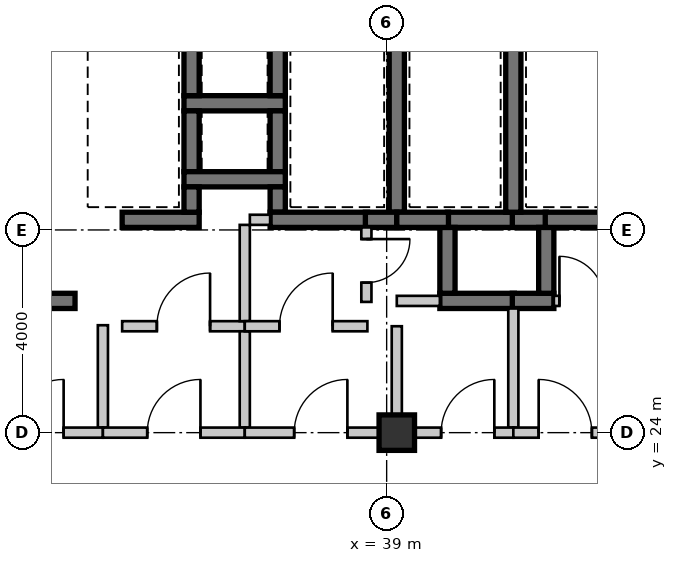
"""IFC4 building model, lengths in metres.
Left out: names, types, materials, properties, quantities, classifications, styles, units other than length and angle.
Written with IfcOpenShell. Run it as: python <this file> out.ifc"""

import sys

from ifc_helpers import new_model, si_unit, direction, frame, frame_2d, origin, origin_2d, place, context, subcontext, project, spatial, rectangle, extrude, source, transform, mapped, element, fill, save


model = new_model("IFC4")
c1 = context("Model", 3, precision=1e-05, world=origin(), true_north=direction((0.0, 1.0)))
c2 = subcontext(c1, "Body", "Model", "MODEL_VIEW")
j1 = project(units=[si_unit("LENGTHUNIT", "METRE"), si_unit("PLANEANGLEUNIT", "RADIAN")], contexts=[c1])
p1 = place(None, origin())
s1 = spatial("IfcSite", under=j1, at=p1, CompositionType="ELEMENT")
p2 = place(p1, origin())
s2 = spatial("IfcBuilding", under=s1, at=p2, CompositionType="ELEMENT")
p3 = place(p2, frame((0.0, 0.0, 80.85)))
s3 = spatial("IfcBuildingStorey", under=s2, at=p3, CompositionType="ELEMENT", Elevation=80.85)
m1 = source(origin(), c2, "Body", "SweptSolid", [
    extrude(rectangle(XDim=0.7, YDim=0.7, at=origin_2d()), origin(), (0.0, 0.0, 1.0), 3.15),
])
p4 = place(p3, frame((39.2, 24.0, 0.0), z_axis=(0.0, 0.0, 1.0), x_axis=(1.0, 0.0, 0.0)))
e1 = element("IfcColumn", 1, at=p4, inside=s3, PredefinedType="COLUMN", context=c2, shape_type="MappedRepresentation", body=[
    mapped(m1, transform((0.0, 0.0, 0.0), scale=1.0)),
])
m2 = source(origin(), c2, "Body", "SweptSolid", [
    extrude(rectangle(XDim=2.0, YDim=0.3, at=frame_2d((1.0, 0.0))), origin(), (0.0, 0.0, 1.0), 2.93),
])
p5 = place(p3, frame((35.0, 30.5, 0.0), z_axis=(0.0, 0.0, 1.0), x_axis=(1.0, 0.0, 0.0)))
e2 = element("IfcWall", 2, at=p5, inside=s3, PredefinedType="SHEAR", context=c2, shape_type="MappedRepresentation", body=[
    mapped(m2, transform((0.0, 0.0, 0.0), scale=1.0)),
])
m3 = source(origin(), c2, "Body", "SweptSolid", [
    extrude(rectangle(XDim=1.2, YDim=0.3, at=frame_2d((0.6, 0.0))), origin(), (0.0, 0.0, 1.0), 2.93),
])
for number, where, z_axis, x_axis in (
    (3, (35.15, 31.85, 0.0), (0.0, 0.0, 1.0), (0.0, -1.0, 0.0)),
    (4, (36.85, 30.65, 0.0), (0.0, 0.0, 1.0), (0.0, 1.0, 0.0)),
    (5, (35.15, 30.35, 0.0), (0.0, 0.0, 1.0), (0.0, -1.0, 0.0)),
    (6, (36.85, 29.15, 0.0), (0.0, 0.0, 1.0), (0.0, 1.0, 0.0)),
):
    element("IfcWall", number, at=place(p3, frame(where, z_axis=z_axis, x_axis=x_axis)), inside=s3, PredefinedType="SHEAR", context=c2, shape_type="MappedRepresentation", body=[
        mapped(m3, transform((0.0, 0.0, 0.0), scale=1.0)),
    ])
p6 = place(p3, frame((35.0, 29.0, 0.0), z_axis=(0.0, 0.0, 1.0), x_axis=(1.0, 0.0, 0.0)))
e7 = element("IfcWall", 7, at=p6, inside=s3, PredefinedType="SHEAR", context=c2, shape_type="MappedRepresentation", body=[
    mapped(m2, transform((0.0, 0.0, 0.0), scale=1.0)),
])
m4 = source(origin(), c2, "Body", "SweptSolid", [
    extrude(rectangle(XDim=2.2, YDim=0.3, at=frame_2d((1.1, 0.0))), origin(), (0.0, 0.0, 1.0), 2.93),
])
p7 = place(p3, frame((30.65, 26.6, 0.0), z_axis=(0.0, 0.0, 1.0), x_axis=(1.0, 0.0, 0.0)))
e8 = element("IfcWall", 8, at=p7, inside=s3, PredefinedType="SHEAR", context=c2, shape_type="MappedRepresentation", body=[
    mapped(m4, transform((0.0, 0.0, 0.0), scale=1.0)),
])
m5 = source(origin(), c2, "Body", "SweptSolid", [
    extrude(rectangle(XDim=1.32, YDim=0.3, at=frame_2d((0.66, 0.0))), origin(), (0.0, 0.0, 1.0), 2.93),
])
p8 = place(p3, frame((41.52, 28.2, 0.0), z_axis=(0.0, 0.0, 1.0), x_axis=(-1.0, 0.0, 0.0)))
e9 = element("IfcWall", 9, at=p8, inside=s3, PredefinedType="SHEAR", context=c2, shape_type="MappedRepresentation", body=[
    mapped(m5, transform((0.0, 0.0, 0.0), scale=1.0)),
])
m6 = source(origin(), c2, "Body", "SweptSolid", [
    extrude(rectangle(XDim=0.67, YDim=0.3, at=frame_2d((0.335, 0.0))), origin(), (0.0, 0.0, 1.0), 2.93),
])
p9 = place(p3, frame((42.15, 28.2, 0.0), z_axis=(0.0, 0.0, 1.0), x_axis=(-1.0, 0.0, 0.0)))
e10 = element("IfcWall", 10, at=p9, inside=s3, PredefinedType="SHEAR", context=c2, shape_type="MappedRepresentation", body=[
    mapped(m6, transform((0.0, 0.0, 0.0), scale=1.0)),
])
m7 = source(origin(), c2, "Body", "SweptSolid", [
    extrude(rectangle(XDim=1.47, YDim=0.3, at=frame_2d((0.735, 0.0))), origin(), (0.0, 0.0, 1.0), 2.93),
])
p10 = place(p3, frame((40.05, 26.6, 0.0), z_axis=(0.0, 0.0, 1.0), x_axis=(1.0, 0.0, 0.0)))
e11 = element("IfcWall", 11, at=p10, inside=s3, PredefinedType="SHEAR", context=c2, shape_type="MappedRepresentation", body=[
    mapped(m7, transform((0.0, 0.0, 0.0), scale=1.0)),
])
m8 = source(origin(), c2, "Body", "SweptSolid", [
    extrude(rectangle(XDim=1.3, YDim=0.3, at=frame_2d((0.65, 0.0))), origin(), (0.0, 0.0, 1.0), 2.93),
])
p11 = place(p3, frame((40.2, 28.05, 0.0), z_axis=(0.0, 0.0, 1.0), x_axis=(0.0, -1.0, 0.0)))
e12 = element("IfcWall", 12, at=p11, inside=s3, PredefinedType="SHEAR", context=c2, shape_type="MappedRepresentation", body=[
    mapped(m8, transform((0.0, 0.0, 0.0), scale=1.0)),
])
m9 = source(origin(), c2, "Body", "SweptSolid", [
    extrude(rectangle(XDim=0.82, YDim=0.3, at=frame_2d((0.41, 0.0))), origin(), (0.0, 0.0, 1.0), 2.93),
])
p12 = place(p3, frame((41.48, 26.6, 0.0), z_axis=(0.0, 0.0, 1.0), x_axis=(1.0, 0.0, 0.0)))
e13 = element("IfcWall", 13, at=p12, inside=s3, PredefinedType="SHEAR", context=c2, shape_type="MappedRepresentation", body=[
    mapped(m9, transform((0.0, 0.0, 0.0), scale=1.0)),
])
p13 = place(p3, frame((42.15, 26.75, 0.0), z_axis=(0.0, 0.0, 1.0), x_axis=(0.0, 1.0, 0.0)))
e14 = element("IfcWall", 14, at=p13, inside=s3, PredefinedType="SHEAR", context=c2, shape_type="MappedRepresentation", body=[
    mapped(m8, transform((0.0, 0.0, 0.0), scale=1.0)),
])
m10 = source(origin(), c2, "Body", "SweptSolid", [
    extrude(rectangle(XDim=1.52, YDim=0.3, at=frame_2d((0.76, 0.0))), origin(), (0.0, 0.0, 1.0), 2.93),
])
p14 = place(p3, frame((33.78, 28.2, 0.0), z_axis=(0.0, 0.0, 1.0), x_axis=(1.0, 0.0, 0.0)))
e15 = element("IfcWall", 15, at=p14, inside=s3, PredefinedType="SHEAR", context=c2, shape_type="MappedRepresentation", body=[
    mapped(m10, transform((0.0, 0.0, 0.0), scale=1.0)),
])
m11 = source(origin(), c2, "Body", "SweptSolid", [
    extrude(rectangle(XDim=0.5, YDim=0.3, at=frame_2d((0.25, 0.0))), origin(), (0.0, 0.0, 1.0), 2.93),
])
p15 = place(p3, frame((35.15, 28.35, 0.0), z_axis=(0.0, 0.0, 1.0), x_axis=(0.0, 1.0, 0.0)))
e16 = element("IfcWall", 16, at=p15, inside=s3, PredefinedType="SHEAR", context=c2, shape_type="MappedRepresentation", body=[
    mapped(m11, transform((0.0, 0.0, 0.0), scale=1.0)),
])
m12 = source(origin(), c2, "Body", "SweptSolid", [
    extrude(rectangle(XDim=3.5, YDim=0.3, at=frame_2d((1.75, 0.0))), origin(), (0.0, 0.0, 1.0), 2.93),
])
p16 = place(p3, frame((39.2, 28.35, 0.0), z_axis=(0.0, 0.0, 1.0), x_axis=(0.0, 1.0, 0.0)))
e17 = element("IfcWall", 17, at=p16, inside=s3, PredefinedType="SHEAR", context=c2, shape_type="MappedRepresentation", body=[
    mapped(m12, transform((0.0, 0.0, 0.0), scale=1.0)),
])
p17 = place(p3, frame((36.85, 28.85, 0.0), z_axis=(0.0, 0.0, 1.0), x_axis=(0.0, -1.0, 0.0)))
e18 = element("IfcWall", 18, at=p17, inside=s3, PredefinedType="SHEAR", context=c2, shape_type="MappedRepresentation", body=[
    mapped(m11, transform((0.0, 0.0, 0.0), scale=1.0)),
])
m13 = source(origin(), c2, "Body", "SweptSolid", [
    extrude(rectangle(XDim=1.92, YDim=0.3, at=frame_2d((0.96, 0.0))), origin(), (0.0, 0.0, 1.0), 2.93),
])
p18 = place(p3, frame((36.7, 28.2, 0.0), z_axis=(0.0, 0.0, 1.0), x_axis=(1.0, 0.0, 0.0)))
e19 = element("IfcWall", 19, at=p18, inside=s3, PredefinedType="SHEAR", context=c2, shape_type="MappedRepresentation", body=[
    mapped(m13, transform((0.0, 0.0, 0.0), scale=1.0)),
])
m14 = source(origin(), c2, "Body", "SweptSolid", [
    extrude(rectangle(XDim=0.62, YDim=0.3, at=frame_2d((0.31, 0.0))), origin(), (0.0, 0.0, 1.0), 2.93),
])
p19 = place(p3, frame((38.58, 28.2, 0.0), z_axis=(0.0, 0.0, 1.0), x_axis=(1.0, 0.0, 0.0)))
e20 = element("IfcWall", 20, at=p19, inside=s3, PredefinedType="SHEAR", context=c2, shape_type="MappedRepresentation", body=[
    mapped(m14, transform((0.0, 0.0, 0.0), scale=1.0)),
])
p20 = place(p3, frame((41.5, 28.35, 0.0), z_axis=(0.0, 0.0, 1.0), x_axis=(0.0, 1.0, 0.0)))
e21 = element("IfcWall", 21, at=p20, inside=s3, PredefinedType="SHEAR", context=c2, shape_type="MappedRepresentation", body=[
    mapped(m12, transform((0.0, 0.0, 0.0), scale=1.0)),
])
m15 = source(origin(), c2, "Body", "SweptSolid", [
    extrude(rectangle(XDim=1.02, YDim=0.3, at=frame_2d((0.51, 0.0))), origin(), (0.0, 0.0, 1.0), 2.93),
])
p21 = place(p3, frame((39.2, 28.2, 0.0), z_axis=(0.0, 0.0, 1.0), x_axis=(1.0, 0.0, 0.0)))
e22 = element("IfcWall", 22, at=p21, inside=s3, PredefinedType="SHEAR", context=c2, shape_type="MappedRepresentation", body=[
    mapped(m15, transform((0.0, 0.0, 0.0), scale=1.0)),
])
m16 = source(origin(), c2, "Body", "SweptSolid", [
    extrude(rectangle(XDim=1.44, YDim=0.3, at=frame_2d((0.72, 0.0))), origin(), (0.0, 0.0, 1.0), 2.93),
])
p22 = place(p3, frame((42.13, 28.2, 0.0), z_axis=(0.0, 0.0, 1.0), x_axis=(1.0, 0.0, 0.0)))
e23 = element("IfcWall", 23, at=p22, inside=s3, PredefinedType="SHEAR", context=c2, shape_type="MappedRepresentation", body=[
    mapped(m16, transform((0.0, 0.0, 0.0), scale=1.0)),
])
m17 = source(origin(), c2, "Body", "SweptSolid", [
    extrude(rectangle(XDim=2.02, YDim=0.2, at=frame_2d((1.01, 0.0))), origin(), (0.0, 0.0, 1.0), 2.93),
])
p23 = place(p3, frame((33.4, 26.12, 0.0), z_axis=(0.0, 0.0, 1.0), x_axis=(0.0, -1.0, 0.0)))
e24 = element("IfcWall", 24, at=p23, inside=s3, PredefinedType="SOLIDWALL", context=c2, shape_type="MappedRepresentation", body=[
    mapped(m17, transform((0.0, 0.0, 0.0), scale=1.0)),
])
m18 = source(origin(), c2, "Body", "SweptSolid", [
    extrude(rectangle(XDim=2.6, YDim=0.2, at=frame_2d((1.3, 0.0))), origin(), (0.0, 0.0, 1.0), 2.47),
])
p24 = place(p3, frame((33.4, 24.0, 0.0), z_axis=(0.0, 0.0, 1.0), x_axis=(-1.0, 0.0, 0.0)))
e25 = element("IfcWall", 25, at=p24, inside=s3, PredefinedType="SOLIDWALL", context=c2, shape_type="MappedRepresentation", body=[
    mapped(m18, transform((0.0, 0.0, 0.0), scale=1.0)),
])
m19 = source(origin(), c2, "Body", "SweptSolid", [
    extrude(rectangle(XDim=1.05, YDim=2.1, at=frame_2d((0.525, 1.05))), frame((0.0, 0.11, 0.0), z_axis=(0.0, -1.0, 0.0), x_axis=(1.0, 0.0, 0.0)), (0.0, 0.0, 1.0), 0.22),
])
p25 = place(p24, frame((0.775, 0.0, 0.0)))
e26 = element("IfcOpeningElement", 26, at=p25, cuts=e25, PredefinedType="OPENING", context=c2, shape_type="MappedRepresentation", body=[
    mapped(m19, transform((0.0, 0.0, 0.0), scale=1.0)),
])
m20 = source(origin(), c2, "Body", "SweptSolid", [
    extrude(rectangle(XDim=2.42, YDim=0.2, at=frame_2d((1.21, 0.0))), origin(), (0.0, 0.0, 1.0), 2.93),
])
p26 = place(p3, frame((33.78, 26.1, 0.0), z_axis=(0.0, 0.0, 1.0), x_axis=(1.0, 0.0, 0.0)))
e27 = element("IfcWall", 27, at=p26, inside=s3, PredefinedType="SOLIDWALL", context=c2, shape_type="MappedRepresentation", body=[
    mapped(m20, transform((0.0, 0.0, 0.0), scale=1.0)),
])
p27 = place(p26, frame((0.685, 0.0, 0.0)))
e28 = element("IfcOpeningElement", 28, at=p27, cuts=e27, PredefinedType="OPENING", context=c2, shape_type="MappedRepresentation", body=[
    mapped(m19, transform((0.0, 0.0, 0.0), scale=1.0)),
])
m21 = source(origin(), c2, "Body", "SweptSolid", [
    extrude(rectangle(XDim=1.9, YDim=0.2, at=frame_2d((0.95, 0.0))), origin(), (0.0, 0.0, 1.0), 2.93),
])
p28 = place(p3, frame((36.2, 26.0, 0.0), z_axis=(0.0, 0.0, 1.0), x_axis=(0.0, -1.0, 0.0)))
e29 = element("IfcWall", 29, at=p28, inside=s3, PredefinedType="SOLIDWALL", context=c2, shape_type="MappedRepresentation", body=[
    mapped(m21, transform((0.0, 0.0, 0.0), scale=1.0)),
])
m22 = source(origin(), c2, "Body", "SweptSolid", [
    extrude(rectangle(XDim=2.8, YDim=0.2, at=frame_2d((1.4, 0.0))), origin(), (0.0, 0.0, 1.0), 2.47),
])
p29 = place(p3, frame((36.2, 24.0, 0.0), z_axis=(0.0, 0.0, 1.0), x_axis=(-1.0, 0.0, 0.0)))
e30 = element("IfcWall", 30, at=p29, inside=s3, PredefinedType="SOLIDWALL", context=c2, shape_type="MappedRepresentation", body=[
    mapped(m22, transform((0.0, 0.0, 0.0), scale=1.0)),
])
p30 = place(p29, frame((0.875, 0.0, 0.0)))
e31 = element("IfcOpeningElement", 31, at=p30, cuts=e30, PredefinedType="OPENING", context=c2, shape_type="MappedRepresentation", body=[
    mapped(m19, transform((0.0, 0.0, 0.0), scale=1.0)),
])
m23 = source(origin(), c2, "Body", "SweptSolid", [
    extrude(rectangle(XDim=1.9, YDim=0.2, at=frame_2d((0.95, 0.0))), origin(), (0.0, 0.0, 1.0), 2.93),
])
p31 = place(p3, frame((36.2, 28.1, 0.0), z_axis=(0.0, 0.0, 1.0), x_axis=(0.0, -1.0, 0.0)))
e32 = element("IfcWall", 32, at=p31, inside=s3, PredefinedType="SOLIDWALL", context=c2, shape_type="MappedRepresentation", body=[
    mapped(m23, transform((0.0, 0.0, 0.0), scale=1.0)),
])
m24 = source(origin(), c2, "Body", "SweptSolid", [
    extrude(rectangle(XDim=0.4, YDim=0.2, at=frame_2d((0.2, 0.0))), origin(), (0.0, 0.0, 1.0), 2.93),
])
p32 = place(p3, frame((36.7, 28.2, 0.0), z_axis=(0.0, 0.0, 1.0), x_axis=(-1.0, 0.0, 0.0)))
e33 = element("IfcWall", 33, at=p32, inside=s3, PredefinedType="SOLIDWALL", context=c2, shape_type="MappedRepresentation", body=[
    mapped(m24, transform((0.0, 0.0, 0.0), scale=1.0)),
])
m25 = source(origin(), c2, "Body", "SweptSolid", [
    extrude(rectangle(XDim=2.42, YDim=0.2, at=frame_2d((1.21, 0.0))), origin(), (0.0, 0.0, 1.0), 2.93),
])
p33 = place(p3, frame((36.2, 26.1, 0.0), z_axis=(0.0, 0.0, 1.0), x_axis=(1.0, 0.0, 0.0)))
e34 = element("IfcWall", 34, at=p33, inside=s3, PredefinedType="SOLIDWALL", context=c2, shape_type="MappedRepresentation", body=[
    mapped(m25, transform((0.0, 0.0, 0.0), scale=1.0)),
])
p34 = place(p33, frame((0.685, 0.0, 0.0)))
e35 = element("IfcOpeningElement", 35, at=p34, cuts=e34, PredefinedType="OPENING", context=c2, shape_type="MappedRepresentation", body=[
    mapped(m19, transform((0.0, 0.0, 0.0), scale=1.0)),
])
m26 = source(origin(), c2, "Body", "SweptSolid", [
    extrude(rectangle(XDim=2.0, YDim=0.2, at=frame_2d((1.0, 0.0))), origin(), (0.0, 0.0, 1.0), 2.47),
])
p35 = place(p3, frame((39.2, 26.1, 0.0), z_axis=(0.0, 0.0, 1.0), x_axis=(0.0, -1.0, 0.0)))
e36 = element("IfcWall", 36, at=p35, inside=s3, PredefinedType="SOLIDWALL", context=c2, shape_type="MappedRepresentation", body=[
    mapped(m26, transform((0.0, 0.0, 0.0), scale=1.0)),
])
m27 = source(origin(), c2, "Body", "SweptSolid", [
    extrude(rectangle(XDim=3.0, YDim=0.2, at=frame_2d((1.5, 0.0))), origin(), (0.0, 0.0, 1.0), 2.47),
])
p36 = place(p3, frame((39.2, 24.0, 0.0), z_axis=(0.0, 0.0, 1.0), x_axis=(-1.0, 0.0, 0.0)))
e37 = element("IfcWall", 37, at=p36, inside=s3, PredefinedType="SOLIDWALL", context=c2, shape_type="MappedRepresentation", body=[
    mapped(m27, transform((0.0, 0.0, 0.0), scale=1.0)),
])
p37 = place(p36, frame((0.975, 0.0, 0.0)))
e38 = element("IfcOpeningElement", 38, at=p37, cuts=e37, PredefinedType="OPENING", context=c2, shape_type="MappedRepresentation", body=[
    mapped(m19, transform((0.0, 0.0, 0.0), scale=1.0)),
])
m28 = source(origin(), c2, "Body", "SweptSolid", [
    extrude(rectangle(XDim=1.47, YDim=0.2, at=frame_2d((0.735, 0.0))), origin(), (0.0, 0.0, 1.0), 2.93),
])
p38 = place(p3, frame((38.6, 28.05, 0.0), z_axis=(0.0, 0.0, 1.0), x_axis=(0.0, -1.0, 0.0)))
e39 = element("IfcWall", 39, at=p38, inside=s3, PredefinedType="SOLIDWALL", context=c2, shape_type="MappedRepresentation", body=[
    mapped(m28, transform((0.0, 0.0, 0.0), scale=1.0)),
])
m29 = source(origin(), c2, "Body", "SweptSolid", [
    extrude(rectangle(XDim=0.86, YDim=2.1, at=frame_2d((0.43, 1.05))), frame((0.0, 0.11, 0.0), z_axis=(0.0, -1.0, 0.0), x_axis=(1.0, 0.0, 0.0)), (0.0, 0.0, 1.0), 0.22),
])
p39 = place(p38, frame((0.23, 0.0, 0.0)))
e40 = element("IfcOpeningElement", 40, at=p39, cuts=e39, PredefinedType="OPENING", context=c2, shape_type="MappedRepresentation", body=[
    mapped(m29, transform((0.0, 0.0, 0.0), scale=1.0)),
])
m30 = source(origin(), c2, "Body", "SweptSolid", [
    extrude(rectangle(XDim=0.85, YDim=0.2, at=frame_2d((0.425, 0.0))), origin(), (0.0, 0.0, 1.0), 2.93),
])
p40 = place(p3, frame((39.2, 26.6, 0.0), z_axis=(0.0, 0.0, 1.0), x_axis=(1.0, 0.0, 0.0)))
e41 = element("IfcWall", 41, at=p40, inside=s3, PredefinedType="SOLIDWALL", context=c2, shape_type="MappedRepresentation", body=[
    mapped(m30, transform((0.0, 0.0, 0.0), scale=1.0)),
])
m31 = source(origin(), c2, "Body", "SweptSolid", [
    extrude(rectangle(XDim=2.35, YDim=0.2, at=frame_2d((1.175, 0.0))), origin(), (0.0, 0.0, 1.0), 2.93),
])
p41 = place(p3, frame((41.5, 26.45, 0.0), z_axis=(0.0, 0.0, 1.0), x_axis=(0.0, -1.0, 0.0)))
e42 = element("IfcWall", 42, at=p41, inside=s3, PredefinedType="SOLIDWALL", context=c2, shape_type="MappedRepresentation", body=[
    mapped(m31, transform((0.0, 0.0, 0.0), scale=1.0)),
])
m32 = source(origin(), c2, "Body", "SweptSolid", [
    extrude(rectangle(XDim=2.3, YDim=0.2, at=frame_2d((1.15, 0.0))), origin(), (0.0, 0.0, 1.0), 2.397),
])
p42 = place(p3, frame((41.5, 24.0, 0.0), z_axis=(0.0, 0.0, 1.0), x_axis=(-1.0, 0.0, 0.0)))
e43 = element("IfcWall", 43, at=p42, inside=s3, PredefinedType="SOLIDWALL", context=c2, shape_type="MappedRepresentation", body=[
    mapped(m32, transform((0.0, 0.0, 0.0), scale=1.0)),
])
p43 = place(p42, frame((0.375, 0.0, 0.0)))
e44 = element("IfcOpeningElement", 44, at=p43, cuts=e43, PredefinedType="OPENING", context=c2, shape_type="MappedRepresentation", body=[
    mapped(m19, transform((0.0, 0.0, 0.0), scale=1.0)),
])
m33 = source(origin(), c2, "Body", "SweptSolid", [
    extrude(rectangle(XDim=1.25, YDim=0.2, at=frame_2d((0.625, 0.0))), origin(), (0.0, 0.0, 1.0), 2.93),
])
p44 = place(p3, frame((42.3, 26.6, 0.0), z_axis=(0.0, 0.0, 1.0), x_axis=(1.0, 0.0, 0.0)))
e45 = element("IfcWall", 45, at=p44, inside=s3, PredefinedType="SOLIDWALL", context=c2, shape_type="MappedRepresentation", body=[
    mapped(m33, transform((0.0, 0.0, 0.0), scale=1.0)),
])
m34 = source(origin(), c2, "Body", "SweptSolid", [
    extrude(rectangle(XDim=0.88, YDim=2.1, at=frame_2d((0.44, 1.05))), frame((0.0, 0.11, 0.0), z_axis=(0.0, -1.0, 0.0), x_axis=(1.0, 0.0, 0.0)), (0.0, 0.0, 1.0), 0.22),
])
p45 = place(p44, frame((0.11, 0.0, 0.0)))
e46 = element("IfcOpeningElement", 46, at=p45, cuts=e45, PredefinedType="OPENING", context=c2, shape_type="MappedRepresentation", body=[
    mapped(m34, transform((0.0, 0.0, 0.0), scale=1.0)),
])
m35 = source(origin(), c2, "Body", "SweptSolid", [
    extrude(rectangle(XDim=2.05, YDim=0.2, at=frame_2d((1.025, 0.0))), origin(), (0.0, 0.0, 1.0), 2.397),
])
p46 = place(p3, frame((43.55, 24.0, 0.0), z_axis=(0.0, 0.0, 1.0), x_axis=(-1.0, 0.0, 0.0)))
e47 = element("IfcWall", 47, at=p46, inside=s3, PredefinedType="SOLIDWALL", context=c2, shape_type="MappedRepresentation", body=[
    mapped(m35, transform((0.0, 0.0, 0.0), scale=1.0)),
])
p47 = place(p46, frame((0.5, 0.0, 0.0)))
e48 = element("IfcOpeningElement", 48, at=p47, cuts=e47, PredefinedType="OPENING", context=c2, shape_type="MappedRepresentation", body=[
    mapped(m19, transform((0.0, 0.0, 0.0), scale=1.0)),
])
m36 = source(origin(), c2, "Body", "SweptSolid", [
    extrude(rectangle(XDim=1.05, YDim=2.1, at=frame_2d((0.525, 1.05))), frame((0.0, 0.025, 0.0), z_axis=(0.0, -1.0, 0.0), x_axis=(1.0, 0.0, 0.0)), (0.0, 0.0, 1.0), 0.05),
])
p48 = place(p25, frame((1.05, 0.0, 0.0), z_axis=(0.0, 0.0, 1.0), x_axis=(-1.0, 0.0, 0.0)))
e49 = element("IfcDoor", 49, at=p48, inside=s3, OperationType="SINGLE_SWING_RIGHT", PredefinedType="DOOR", context=c2, shape_type="MappedRepresentation", body=[
    mapped(m36, transform((0.0, 0.0, 0.0), scale=1.0)),
])
fill(e26, e49)
p49 = place(p27, origin())
e50 = element("IfcDoor", 50, at=p49, inside=s3, OperationType="SINGLE_SWING_RIGHT", PredefinedType="DOOR", context=c2, shape_type="MappedRepresentation", body=[
    mapped(m36, transform((0.0, 0.0, 0.0), scale=1.0)),
])
fill(e28, e50)
p50 = place(p30, frame((1.05, 0.0, 0.0), z_axis=(0.0, 0.0, 1.0), x_axis=(-1.0, 0.0, 0.0)))
e51 = element("IfcDoor", 51, at=p50, inside=s3, OperationType="SINGLE_SWING_RIGHT", PredefinedType="DOOR", context=c2, shape_type="MappedRepresentation", body=[
    mapped(m36, transform((0.0, 0.0, 0.0), scale=1.0)),
])
fill(e31, e51)
p51 = place(p34, origin())
e52 = element("IfcDoor", 52, at=p51, inside=s3, OperationType="SINGLE_SWING_RIGHT", PredefinedType="DOOR", context=c2, shape_type="MappedRepresentation", body=[
    mapped(m36, transform((0.0, 0.0, 0.0), scale=1.0)),
])
fill(e35, e52)
p52 = place(p37, frame((1.05, 0.0, 0.0), z_axis=(0.0, 0.0, 1.0), x_axis=(-1.0, 0.0, 0.0)))
e53 = element("IfcDoor", 53, at=p52, inside=s3, OperationType="SINGLE_SWING_RIGHT", PredefinedType="DOOR", context=c2, shape_type="MappedRepresentation", body=[
    mapped(m36, transform((0.0, 0.0, 0.0), scale=1.0)),
])
fill(e38, e53)
p53 = place(p43, frame((1.05, 0.0, 0.0), z_axis=(0.0, 0.0, 1.0), x_axis=(-1.0, 0.0, 0.0)))
e54 = element("IfcDoor", 54, at=p53, inside=s3, OperationType="SINGLE_SWING_RIGHT", PredefinedType="DOOR", context=c2, shape_type="MappedRepresentation", body=[
    mapped(m36, transform((0.0, 0.0, 0.0), scale=1.0)),
])
fill(e44, e54)
m37 = source(origin(), c2, "Body", "SweptSolid", [
    extrude(rectangle(XDim=0.88, YDim=2.1, at=frame_2d((0.44, 1.05))), frame((0.0, 0.025, 0.0), z_axis=(0.0, -1.0, 0.0), x_axis=(1.0, 0.0, 0.0)), (0.0, 0.0, 1.0), 0.05),
])
p54 = place(p45, origin())
e55 = element("IfcDoor", 55, at=p54, inside=s3, OperationType="SINGLE_SWING_LEFT", PredefinedType="DOOR", context=c2, shape_type="MappedRepresentation", body=[
    mapped(m37, transform((0.0, 0.0, 0.0), scale=1.0)),
])
fill(e46, e55)
p55 = place(p47, frame((1.05, 0.0, 0.0), z_axis=(0.0, 0.0, 1.0), x_axis=(-1.0, 0.0, 0.0)))
e56 = element("IfcDoor", 56, at=p55, inside=s3, OperationType="SINGLE_SWING_LEFT", PredefinedType="DOOR", context=c2, shape_type="MappedRepresentation", body=[
    mapped(m36, transform((0.0, 0.0, 0.0), scale=1.0)),
])
fill(e48, e56)
m38 = source(origin(), c2, "Body", "SweptSolid", [
    extrude(rectangle(XDim=0.86, YDim=2.1, at=frame_2d((0.43, 1.05))), frame((0.0, 0.025, 0.0), z_axis=(0.0, -1.0, 0.0), x_axis=(1.0, 0.0, 0.0)), (0.0, 0.0, 1.0), 0.05),
])
p56 = place(p39, origin())
e57 = element("IfcDoor", 57, at=p56, inside=s3, OperationType="SINGLE_SWING_LEFT", PredefinedType="DOOR", context=c2, shape_type="MappedRepresentation", body=[
    mapped(m38, transform((0.0, 0.0, 0.0), scale=1.0)),
])
fill(e40, e57)
save(model, sys.argv[1])
